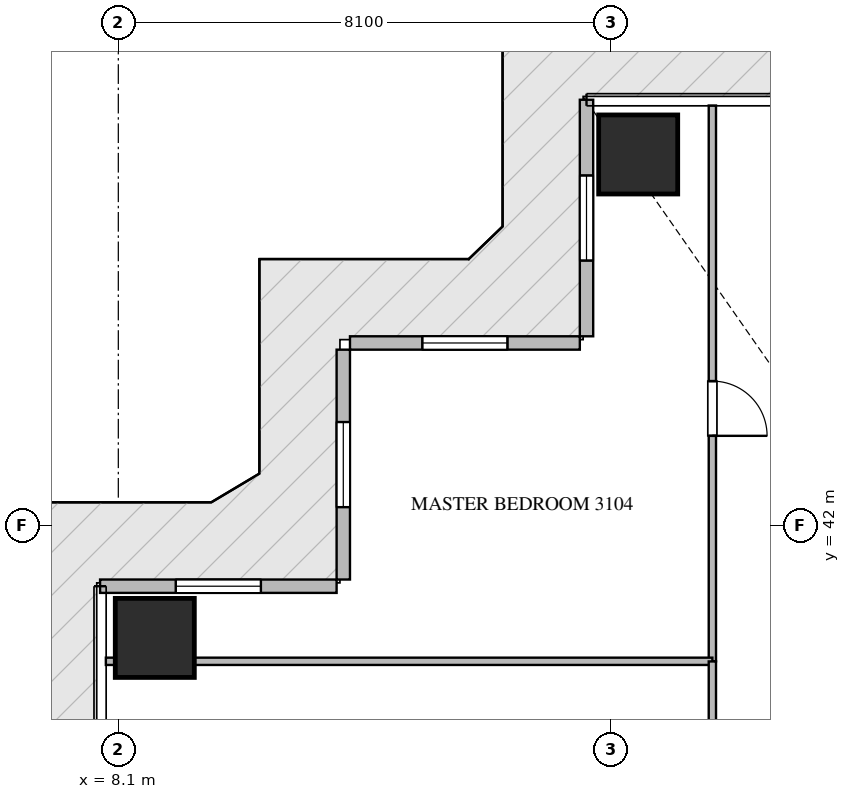
"""IFC4 building model, lengths in metres.
Left out: names, types, materials, properties, quantities, classifications, styles, units other than length and angle.
Written with IfcOpenShell. Run it as: python <this file> out.ifc"""

import sys

from ifc_helpers import new_model, si_unit, direction, frame, frame_2d, origin, origin_2d, place, context, subcontext, project, spatial, rectangle, extrude, source, transform, mapped, element, fill, save


model = new_model("IFC4")
c1 = context("Model", 3, precision=1e-05, world=origin(), true_north=direction((0.0, 1.0)))
c2 = subcontext(c1, "Body", "Model", "MODEL_VIEW")
j1 = project(units=[si_unit("LENGTHUNIT", "METRE"), si_unit("PLANEANGLEUNIT", "RADIAN")], contexts=[c1])
p1 = place(None, origin())
s1 = spatial("IfcSite", under=j1, at=p1, CompositionType="ELEMENT")
p2 = place(p1, origin())
s2 = spatial("IfcBuilding", under=s1, at=p2, CompositionType="ELEMENT")
p3 = place(p2, frame((0.0, 0.0, 127.65)))
s3 = spatial("IfcBuildingStorey", under=s2, at=p3, CompositionType="ELEMENT", Elevation=127.65)
m1 = source(origin(), c2, "Body", "SweptSolid", [
    extrude(rectangle(XDim=1.3, YDim=1.3, at=origin_2d()), origin(), (0.0, 0.0, 1.0), 3.75),
])
for number, where, z_axis, x_axis in (
    (1, (16.65, 48.1, -0.26), (0.0, 0.0, 1.0), (1.0, 0.0, 0.0)),
    (2, (8.7, 40.15, -0.26), (0.0, 0.0, 1.0), (1.0, 0.0, 0.0)),
):
    element("IfcColumn", number, at=place(p3, frame(where, z_axis=z_axis, x_axis=x_axis)), inside=s3, PredefinedType="COLUMN", context=c2, shape_type="MappedRepresentation", body=[
        mapped(m1, transform((0.0, 0.0, 0.0), scale=1.0)),
    ])
p4 = place(p3, frame((15.8, 49.0, 0.0), z_axis=(0.0, 0.0, 1.0), x_axis=(0.0, -1.0, 0.0)))
e3 = element("IfcWall", 3, at=p4, inside=s3, PredefinedType="ELEMENTEDWALL", context=c2, shape_type="SweptSolid", body=[
    extrude(rectangle(XDim=3.89, YDim=0.22, at=frame_2d((1.945, 0.0))), origin(), (0.0, 0.0, 1.0), 3.475),
])
p5 = place(p4, frame((1.245, 0.0, 0.65)))
e4 = element("IfcOpeningElement", 4, at=p5, cuts=e3, PredefinedType="OPENING", context=c2, shape_type="SweptSolid", body=[
    extrude(rectangle(XDim=1.4, YDim=2.05, at=frame_2d((0.7, 1.025))), frame((0.0, 0.12, 0.0), z_axis=(0.0, -1.0, 0.0), x_axis=(1.0, 0.0, 0.0)), (0.0, 0.0, 1.0), 0.24),
])
p6 = place(p3, frame((15.69, 45.0, 0.0), z_axis=(0.0, 0.0, 1.0), x_axis=(-1.0, 0.0, 0.0)))
e5 = element("IfcWall", 5, at=p6, inside=s3, PredefinedType="ELEMENTEDWALL", context=c2, shape_type="SweptSolid", body=[
    extrude(rectangle(XDim=3.78, YDim=0.22, at=frame_2d((1.89, 0.0))), origin(), (0.0, 0.0, 1.0), 3.475),
])
p7 = place(p6, frame((1.19, 0.0, 0.65)))
e6 = element("IfcOpeningElement", 6, at=p7, cuts=e5, PredefinedType="OPENING", context=c2, shape_type="SweptSolid", body=[
    extrude(rectangle(XDim=1.4, YDim=2.05, at=frame_2d((0.7, 1.025))), frame((0.0, 0.12, 0.0), z_axis=(0.0, -1.0, 0.0), x_axis=(1.0, 0.0, 0.0)), (0.0, 0.0, 1.0), 0.24),
])
p8 = place(p3, frame((11.8, 44.89, 0.0), z_axis=(0.0, 0.0, 1.0), x_axis=(0.0, -1.0, 0.0)))
e7 = element("IfcWall", 7, at=p8, inside=s3, PredefinedType="ELEMENTEDWALL", context=c2, shape_type="SweptSolid", body=[
    extrude(rectangle(XDim=3.78, YDim=0.22, at=frame_2d((1.89, 0.0))), origin(), (0.0, 0.0, 1.0), 3.475),
])
p9 = place(p8, frame((1.19, 0.0, 0.65)))
e8 = element("IfcOpeningElement", 8, at=p9, cuts=e7, PredefinedType="OPENING", context=c2, shape_type="SweptSolid", body=[
    extrude(rectangle(XDim=1.4, YDim=2.05, at=frame_2d((0.7, 1.025))), frame((0.0, 0.12, 0.0), z_axis=(0.0, -1.0, 0.0), x_axis=(1.0, 0.0, 0.0)), (0.0, 0.0, 1.0), 0.24),
])
p10 = place(p3, frame((11.69, 41.0, 0.0), z_axis=(0.0, 0.0, 1.0), x_axis=(-1.0, 0.0, 0.0)))
e9 = element("IfcWall", 9, at=p10, inside=s3, PredefinedType="ELEMENTEDWALL", context=c2, shape_type="SweptSolid", body=[
    extrude(rectangle(XDim=3.89, YDim=0.22, at=frame_2d((1.945, 0.0))), origin(), (0.0, 0.0, 1.0), 3.475),
])
p11 = place(p10, frame((1.245, 0.0, 0.65)))
e10 = element("IfcOpeningElement", 10, at=p11, cuts=e9, PredefinedType="OPENING", context=c2, shape_type="SweptSolid", body=[
    extrude(rectangle(XDim=1.4, YDim=2.05, at=frame_2d((0.7, 1.025))), frame((0.0, 0.12, 0.0), z_axis=(0.0, -1.0, 0.0), x_axis=(1.0, 0.0, 0.0)), (0.0, 0.0, 1.0), 0.24),
])
p12 = place(p3, frame((17.87, 48.905, 0.0), z_axis=(0.0, 0.0, 1.0), x_axis=(0.0, -1.0, 0.0)))
e11 = element("IfcWall", 11, at=p12, inside=s3, PredefinedType="PARTITIONING", context=c2, shape_type="SweptSolid", body=[
    extrude(rectangle(XDim=9.14, YDim=0.12, at=frame_2d((4.57, 0.0))), origin(), (0.0, 0.0, 1.0), 3.49),
])
p13 = place(p12, frame((4.532, 0.0, 0.0)))
e12 = element("IfcOpeningElement", 12, at=p13, cuts=e11, PredefinedType="OPENING", context=c2, shape_type="SweptSolid", body=[
    extrude(rectangle(XDim=0.9, YDim=2.1, at=frame_2d((0.45, 1.05))), frame((0.0, 0.07, 0.0), z_axis=(0.0, -1.0, 0.0), x_axis=(1.0, 0.0, 0.0)), (0.0, 0.0, 1.0), 0.14),
])
p14 = place(p3, frame((7.895, 39.765, 0.0), z_axis=(0.0, 0.0, 1.0), x_axis=(1.0, 0.0, 0.0)))
e13 = element("IfcWall", 13, at=p14, inside=s3, PredefinedType="PARTITIONING", context=c2, shape_type="SweptSolid", body=[
    extrude(rectangle(XDim=9.975, YDim=0.12, at=frame_2d((4.988, 0.0))), origin(), (0.0, 0.0, 1.0), 3.49),
])
p15 = place(p3, frame((17.87, 39.763, 0.0), z_axis=(0.0, 0.0, 1.0), x_axis=(0.0, -1.0, 0.0)))
e14 = element("IfcWall", 14, at=p15, inside=s3, PredefinedType="PARTITIONING", context=c2, shape_type="SweptSolid", body=[
    extrude(rectangle(XDim=4.113, YDim=0.12, at=frame_2d((2.057, 0.0))), origin(), (0.0, 0.0, 1.0), 3.49),
])
p16 = place(p15, frame((1.631, 0.0, 0.0)))
e15 = element("IfcOpeningElement", 15, at=p16, cuts=e14, PredefinedType="OPENING", context=c2, shape_type="SweptSolid", body=[
    extrude(rectangle(XDim=0.85, YDim=2.1, at=frame_2d((0.425, 1.05))), frame((0.0, 0.07, 0.0), z_axis=(0.0, -1.0, 0.0), x_axis=(1.0, 0.0, 0.0)), (0.0, 0.0, 1.0), 0.14),
])
m2 = source(origin(), c2, "Body", "SweptSolid", [
    extrude(rectangle(XDim=1.4, YDim=2.05, at=frame_2d((0.7, 1.025))), frame((0.0, 0.03, 0.0), z_axis=(0.0, -1.0, 0.0), x_axis=(1.0, 0.0, 0.0)), (0.0, 0.0, 1.0), 0.06),
])
p17 = place(p5, origin())
e16 = element("IfcWindow", 16, at=p17, inside=s3, PartitioningType="SINGLE_PANEL", PredefinedType="WINDOW", context=c2, shape_type="MappedRepresentation", body=[
    mapped(m2, transform((0.0, 0.0, 0.0), scale=1.0)),
])
fill(e4, e16)
p18 = place(p7, origin())
e17 = element("IfcWindow", 17, at=p18, inside=s3, PartitioningType="SINGLE_PANEL", PredefinedType="WINDOW", context=c2, shape_type="MappedRepresentation", body=[
    mapped(m2, transform((0.0, 0.0, 0.0), scale=1.0)),
])
fill(e6, e17)
p19 = place(p9, origin())
e18 = element("IfcWindow", 18, at=p19, inside=s3, PartitioningType="SINGLE_PANEL", PredefinedType="WINDOW", context=c2, shape_type="MappedRepresentation", body=[
    mapped(m2, transform((0.0, 0.0, 0.0), scale=1.0)),
])
fill(e8, e18)
p20 = place(p11, origin())
e19 = element("IfcWindow", 19, at=p20, inside=s3, PartitioningType="SINGLE_PANEL", PredefinedType="WINDOW", context=c2, shape_type="MappedRepresentation", body=[
    mapped(m2, transform((0.0, 0.0, 0.0), scale=1.0)),
])
fill(e10, e19)
m3 = source(origin(), c2, "Body", "SweptSolid", [
    extrude(rectangle(XDim=0.9, YDim=2.1, at=frame_2d((0.45, 1.05))), frame((0.0, 0.025, 0.0), z_axis=(0.0, -1.0, 0.0), x_axis=(1.0, 0.0, 0.0)), (0.0, 0.0, 1.0), 0.05),
])
p21 = place(p13, origin())
e20 = element("IfcDoor", 20, at=p21, inside=s3, OperationType="SINGLE_SWING_RIGHT", PredefinedType="DOOR", context=c2, shape_type="MappedRepresentation", body=[
    mapped(m3, transform((0.0, 0.0, 0.0), scale=1.0)),
])
fill(e12, e20)
save(model, sys.argv[1])
